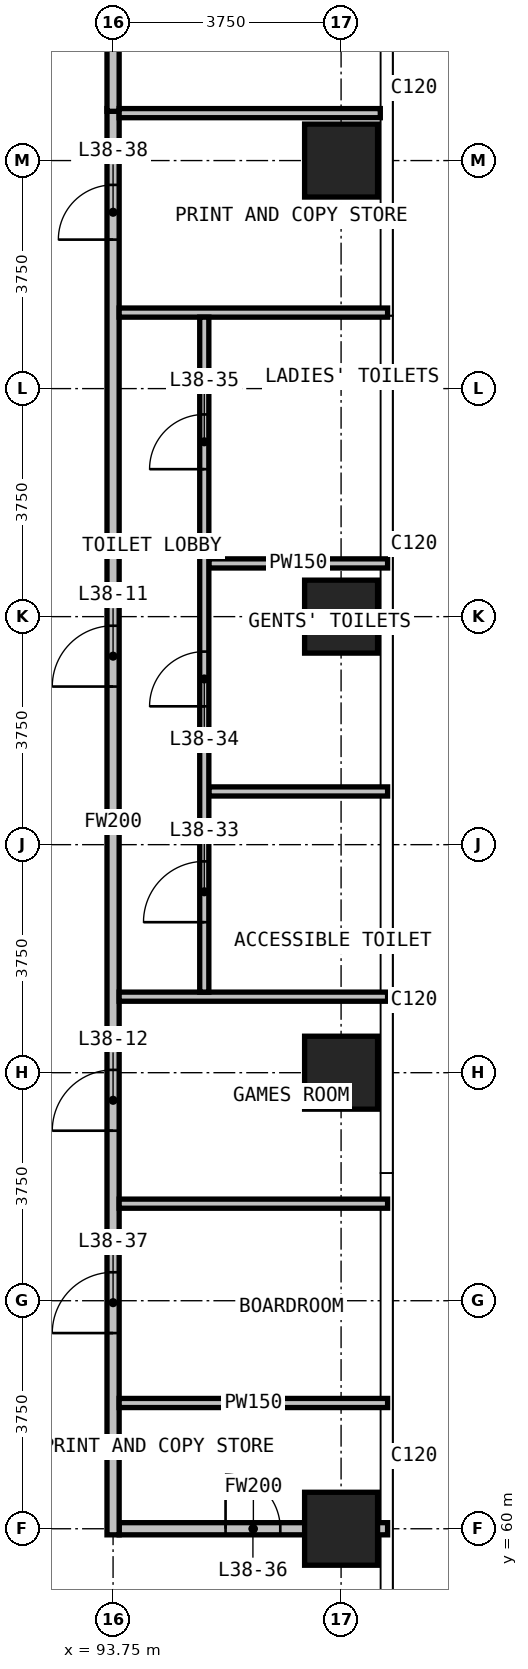
"""IFC4 building model, lengths in metres.
Left out: names, types, materials, properties, quantities, classifications, styles, units other than length and angle.
Written with IfcOpenShell. Run it as: python <this file> out.ifc"""

import sys

from ifc_helpers import new_model, si_unit, direction, frame, frame_2d, origin, origin_2d, place, context, subcontext, project, spatial, rectangle, extrude, element, fill, save


model = new_model("IFC4")
c1 = context("Model", 3, precision=1e-05, world=origin(), true_north=direction((0.0, 1.0)))
c2 = subcontext(c1, "Body", "Model", "MODEL_VIEW")
j1 = project(units=[si_unit("LENGTHUNIT", "METRE"), si_unit("PLANEANGLEUNIT", "RADIAN")], contexts=[c1])
p1 = place(None, origin())
s1 = spatial("IfcSite", under=j1, at=p1, CompositionType="ELEMENT")
p2 = place(p1, origin())
s2 = spatial("IfcBuilding", under=s1, at=p2, CompositionType="ELEMENT")
p3 = place(p2, frame((0.0, 0.0, 151.3)))
s3 = spatial("IfcBuildingStorey", under=s2, at=p3, CompositionType="ELEMENT", Elevation=151.3)
for number, where, z_axis, x_axis in (
    (1, (97.5, 60.0, 0.0), (0.0, 0.0, 1.0), (1.0, 0.0, 0.0)),
    (2, (97.5, 67.5, 0.0), (0.0, 0.0, 1.0), (1.0, 0.0, 0.0)),
    (3, (97.5, 75.0, 0.0), (0.0, 0.0, 1.0), (1.0, 0.0, 0.0)),
    (4, (97.5, 82.5, 0.0), (0.0, 0.0, 1.0), (1.0, 0.0, 0.0)),
):
    element("IfcColumn", number, at=place(p3, frame(where, z_axis=z_axis, x_axis=x_axis)), inside=s3, PredefinedType="COLUMN", context=c2, shape_type="SweptSolid", body=[
        extrude(rectangle(XDim=1.2, YDim=1.2, at=origin_2d()), origin(), (0.0, 0.0, 1.0), 3.6),
    ])
p4 = place(p3, frame((93.85, 60.0, 0.0), z_axis=(0.0, 0.0, 1.0), x_axis=(1.0, 0.0, 0.0)))
e5 = element("IfcWall", 5, at=p4, inside=s3, PredefinedType="PARTITIONING", context=c2, shape_type="SweptSolid", body=[
    extrude(rectangle(XDim=4.415, YDim=0.2, at=frame_2d((2.208, 0.0))), origin(), (0.0, 0.0, 1.0), 3.3),
])
p5 = place(p4, frame((1.75, 0.0, 0.0)))
e6 = element("IfcOpeningElement", 6, at=p5, cuts=e5, PredefinedType="OPENING", context=c2, shape_type="SweptSolid", body=[
    extrude(rectangle(XDim=0.9, YDim=2.2, at=frame_2d((0.45, 1.1))), frame((0.0, 0.11, 0.0), z_axis=(0.0, -1.0, 0.0), x_axis=(1.0, 0.0, 0.0)), (0.0, 0.0, 1.0), 0.22),
])
p6 = place(p3, frame((93.75, 59.9, 0.0), z_axis=(0.0, 0.0, 1.0), x_axis=(0.0, 1.0, 0.0)))
e7 = element("IfcWall", 7, at=p6, inside=s3, PredefinedType="PARTITIONING", context=c2, shape_type="SweptSolid", body=[
    extrude(rectangle(XDim=23.455, YDim=0.2, at=frame_2d((11.728, 0.0))), origin(), (0.0, 0.0, 1.0), 3.3),
])
p7 = place(p6, frame((13.95, 0.0, 0.0)))
e8 = element("IfcOpeningElement", 8, at=p7, cuts=e7, PredefinedType="OPENING", context=c2, shape_type="SweptSolid", body=[
    extrude(rectangle(XDim=1.0, YDim=2.2, at=frame_2d((0.5, 1.1))), frame((0.0, 0.11, 0.0), z_axis=(0.0, -1.0, 0.0), x_axis=(1.0, 0.0, 0.0)), (0.0, 0.0, 1.0), 0.22),
])
p8 = place(p6, frame((6.646, 0.0, 0.0)))
e9 = element("IfcOpeningElement", 9, at=p8, cuts=e7, PredefinedType="OPENING", context=c2, shape_type="SweptSolid", body=[
    extrude(rectangle(XDim=1.0, YDim=2.2, at=frame_2d((0.5, 1.1))), frame((0.0, 0.11, 0.0), z_axis=(0.0, -1.0, 0.0), x_axis=(1.0, 0.0, 0.0)), (0.0, 0.0, 1.0), 0.22),
])
p9 = place(p6, frame((3.318, 0.0, 0.0)))
e10 = element("IfcOpeningElement", 10, at=p9, cuts=e7, PredefinedType="OPENING", context=c2, shape_type="SweptSolid", body=[
    extrude(rectangle(XDim=1.0, YDim=2.2, at=frame_2d((0.5, 1.1))), frame((0.0, 0.11, 0.0), z_axis=(0.0, -1.0, 0.0), x_axis=(1.0, 0.0, 0.0)), (0.0, 0.0, 1.0), 0.22),
])
p10 = place(p6, frame((21.3, 0.0, 0.0)))
e11 = element("IfcOpeningElement", 11, at=p10, cuts=e7, PredefinedType="OPENING", context=c2, shape_type="SweptSolid", body=[
    extrude(rectangle(XDim=0.9, YDim=2.2, at=frame_2d((0.45, 1.1))), frame((0.0, 0.11, 0.0), z_axis=(0.0, -1.0, 0.0), x_axis=(1.0, 0.0, 0.0)), (0.0, 0.0, 1.0), 0.22),
])
p11 = place(p3, frame((93.75, 83.31, 0.0), z_axis=(0.0, 0.0, 1.0), x_axis=(0.0, 1.0, 0.0)))
e12 = element("IfcWall", 12, at=p11, inside=s3, PredefinedType="PARTITIONING", context=c2, shape_type="SweptSolid", body=[
    extrude(rectangle(XDim=7.335, YDim=0.2, at=frame_2d((3.667, 0.0))), origin(), (0.0, 0.0, 1.0), 3.3),
])
for number, where, z_axis, x_axis in (
    (13, (93.85, 62.068, 0.0), (0.0, 0.0, 1.0), (1.0, 0.0, 0.0)),
    (14, (93.85, 65.346, 0.0), (0.0, 0.0, 1.0), (1.0, 0.0, 0.0)),
    (15, (93.85, 68.75, 0.0), (0.0, 0.0, 1.0), (1.0, 0.0, 0.0)),
):
    element("IfcWall", number, at=place(p3, frame(where, z_axis=z_axis, x_axis=x_axis)), inside=s3, PredefinedType="PARTITIONING", context=c2, shape_type="SweptSolid", body=[
        extrude(rectangle(XDim=4.415, YDim=0.15, at=frame_2d((2.208, 0.0))), origin(), (0.0, 0.0, 1.0), 3.3),
    ])
for number, where, z_axis, x_axis in (
    (16, (95.325, 72.125, 0.0), (0.0, 0.0, 1.0), (1.0, 0.0, 0.0)),
    (17, (95.325, 75.875, 0.0), (0.0, 0.0, 1.0), (1.0, 0.0, 0.0)),
):
    element("IfcWall", number, at=place(p3, frame(where, z_axis=z_axis, x_axis=x_axis)), inside=s3, PredefinedType="PARTITIONING", context=c2, shape_type="SweptSolid", body=[
        extrude(rectangle(XDim=2.94, YDim=0.15, at=frame_2d((1.47, 0.0))), origin(), (0.0, 0.0, 1.0), 3.3),
    ])
p12 = place(p3, frame((93.85, 80.0, 0.0), z_axis=(0.0, 0.0, 1.0), x_axis=(1.0, 0.0, 0.0)))
e18 = element("IfcWall", 18, at=p12, inside=s3, PredefinedType="PARTITIONING", context=c2, shape_type="SweptSolid", body=[
    extrude(rectangle(XDim=4.415, YDim=0.15, at=frame_2d((2.208, 0.0))), origin(), (0.0, 0.0, 1.0), 3.3),
])
p13 = place(p3, frame((93.85, 83.28, 0.0), z_axis=(0.0, 0.0, 1.0), x_axis=(1.0, 0.0, 0.0)))
e19 = element("IfcWall", 19, at=p13, inside=s3, PredefinedType="PARTITIONING", context=c2, shape_type="SweptSolid", body=[
    extrude(rectangle(XDim=4.295, YDim=0.15, at=frame_2d((2.147, 0.0))), origin(), (0.0, 0.0, 1.0), 3.3),
])
p14 = place(p3, frame((95.25, 68.825, 0.0), z_axis=(0.0, 0.0, 1.0), x_axis=(0.0, 1.0, 0.0)))
e20 = element("IfcWall", 20, at=p14, inside=s3, PredefinedType="PARTITIONING", context=c2, shape_type="SweptSolid", body=[
    extrude(rectangle(XDim=11.1, YDim=0.15, at=frame_2d((5.55, 0.0))), origin(), (0.0, 0.0, 1.0), 3.3),
])
p15 = place(p14, frame((1.15, 0.0, 0.0)))
e21 = element("IfcOpeningElement", 21, at=p15, cuts=e20, PredefinedType="OPENING", context=c2, shape_type="SweptSolid", body=[
    extrude(rectangle(XDim=1.0, YDim=2.2, at=frame_2d((0.5, 1.1))), frame((0.0, 0.085, 0.0), z_axis=(0.0, -1.0, 0.0), x_axis=(1.0, 0.0, 0.0)), (0.0, 0.0, 1.0), 0.17),
])
p16 = place(p14, frame((4.7, 0.0, 0.0)))
e22 = element("IfcOpeningElement", 22, at=p16, cuts=e20, PredefinedType="OPENING", context=c2, shape_type="SweptSolid", body=[
    extrude(rectangle(XDim=0.9, YDim=2.2, at=frame_2d((0.45, 1.1))), frame((0.0, 0.085, 0.0), z_axis=(0.0, -1.0, 0.0), x_axis=(1.0, 0.0, 0.0)), (0.0, 0.0, 1.0), 0.17),
])
p17 = place(p14, frame((8.6, 0.0, 0.0)))
e23 = element("IfcOpeningElement", 23, at=p17, cuts=e20, PredefinedType="OPENING", context=c2, shape_type="SweptSolid", body=[
    extrude(rectangle(XDim=0.9, YDim=2.2, at=frame_2d((0.45, 1.1))), frame((0.0, 0.085, 0.0), z_axis=(0.0, -1.0, 0.0), x_axis=(1.0, 0.0, 0.0)), (0.0, 0.0, 1.0), 0.17),
])
p18 = place(p7, origin())
e24 = element("IfcDoor", 24, at=p18, inside=s3, OperationType="SINGLE_SWING_LEFT", PredefinedType="DOOR", context=c2, shape_type="SweptSolid", body=[
    extrude(rectangle(XDim=1.0, YDim=2.2, at=frame_2d((0.5, 1.1))), frame((0.0, 0.025, 0.0), z_axis=(0.0, -1.0, 0.0), x_axis=(1.0, 0.0, 0.0)), (0.0, 0.0, 1.0), 0.05),
])
fill(e8, e24)
p19 = place(p8, origin())
e25 = element("IfcDoor", 25, at=p19, inside=s3, OperationType="SINGLE_SWING_RIGHT", PredefinedType="DOOR", context=c2, shape_type="SweptSolid", body=[
    extrude(rectangle(XDim=1.0, YDim=2.2, at=frame_2d((0.5, 1.1))), frame((0.0, 0.025, 0.0), z_axis=(0.0, -1.0, 0.0), x_axis=(1.0, 0.0, 0.0)), (0.0, 0.0, 1.0), 0.05),
])
fill(e9, e25)
p20 = place(p15, origin())
e26 = element("IfcDoor", 26, at=p20, inside=s3, OperationType="SINGLE_SWING_RIGHT", PredefinedType="DOOR", context=c2, shape_type="SweptSolid", body=[
    extrude(rectangle(XDim=1.0, YDim=2.2, at=frame_2d((0.5, 1.1))), frame((0.0, 0.025, 0.0), z_axis=(0.0, -1.0, 0.0), x_axis=(1.0, 0.0, 0.0)), (0.0, 0.0, 1.0), 0.05),
])
fill(e21, e26)
p21 = place(p16, origin())
e27 = element("IfcDoor", 27, at=p21, inside=s3, OperationType="SINGLE_SWING_LEFT", PredefinedType="DOOR", context=c2, shape_type="SweptSolid", body=[
    extrude(rectangle(XDim=0.9, YDim=2.2, at=frame_2d((0.45, 1.1))), frame((0.0, 0.025, 0.0), z_axis=(0.0, -1.0, 0.0), x_axis=(1.0, 0.0, 0.0)), (0.0, 0.0, 1.0), 0.05),
])
fill(e22, e27)
p22 = place(p17, origin())
e28 = element("IfcDoor", 28, at=p22, inside=s3, OperationType="SINGLE_SWING_LEFT", PredefinedType="DOOR", context=c2, shape_type="SweptSolid", body=[
    extrude(rectangle(XDim=0.9, YDim=2.2, at=frame_2d((0.45, 1.1))), frame((0.0, 0.025, 0.0), z_axis=(0.0, -1.0, 0.0), x_axis=(1.0, 0.0, 0.0)), (0.0, 0.0, 1.0), 0.05),
])
fill(e23, e28)
p23 = place(p5, origin())
e29 = element("IfcDoor", 29, at=p23, inside=s3, OperationType="SINGLE_SWING_LEFT", PredefinedType="DOOR", context=c2, shape_type="SweptSolid", body=[
    extrude(rectangle(XDim=0.9, YDim=2.2, at=frame_2d((0.45, 1.1))), frame((0.0, 0.025, 0.0), z_axis=(0.0, -1.0, 0.0), x_axis=(1.0, 0.0, 0.0)), (0.0, 0.0, 1.0), 0.05),
])
fill(e6, e29)
p24 = place(p9, origin())
e30 = element("IfcDoor", 30, at=p24, inside=s3, OperationType="SINGLE_SWING_RIGHT", PredefinedType="DOOR", context=c2, shape_type="SweptSolid", body=[
    extrude(rectangle(XDim=1.0, YDim=2.2, at=frame_2d((0.5, 1.1))), frame((0.0, 0.025, 0.0), z_axis=(0.0, -1.0, 0.0), x_axis=(1.0, 0.0, 0.0)), (0.0, 0.0, 1.0), 0.05),
])
fill(e10, e30)
p25 = place(p10, origin())
e31 = element("IfcDoor", 31, at=p25, inside=s3, OperationType="SINGLE_SWING_RIGHT", PredefinedType="DOOR", context=c2, shape_type="SweptSolid", body=[
    extrude(rectangle(XDim=0.9, YDim=2.2, at=frame_2d((0.45, 1.1))), frame((0.0, 0.025, 0.0), z_axis=(0.0, -1.0, 0.0), x_axis=(1.0, 0.0, 0.0)), (0.0, 0.0, 1.0), 0.05),
])
fill(e11, e31)
save(model, sys.argv[1])
